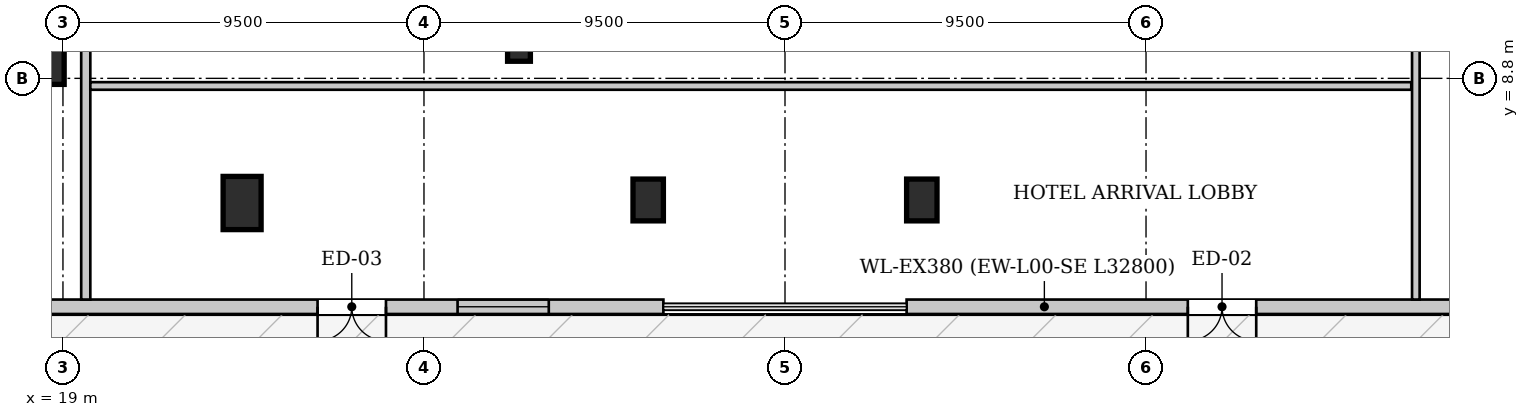
"""IFC4 building model, lengths in metres.
Left out: names, types, materials, properties, quantities, classifications, styles, units other than length and angle.
Written with IfcOpenShell. Run it as: python <this file> out.ifc"""

import sys

from ifc_helpers import new_model, si_unit, direction, frame, frame_2d, origin, origin_2d, place, context, subcontext, project, spatial, rectangle, hollow_rectangle, extrude, source, transform, mapped, element, fill, save


model = new_model("IFC4")
c1 = context("Model", 3, precision=1e-05, world=origin(), true_north=direction((0.0, 1.0)))
c2 = subcontext(c1, "Body", "Model", "MODEL_VIEW")
j1 = project(units=[si_unit("LENGTHUNIT", "METRE"), si_unit("PLANEANGLEUNIT", "RADIAN")], contexts=[c1])
p1 = place(None, origin())
s1 = spatial("IfcSite", under=j1, at=p1, CompositionType="ELEMENT")
p2 = place(p1, origin())
s2 = spatial("IfcBuilding", under=s1, at=p2, CompositionType="ELEMENT")
p3 = place(p2, origin())
s3 = spatial("IfcBuildingStorey", under=s2, at=p3, CompositionType="ELEMENT", Elevation=0.0)
m1 = source(origin(), c2, "Body", "SweptSolid", [
    extrude(rectangle(XDim=1.0, YDim=1.4, at=origin_2d()), origin(), (0.0, 0.0, 1.0), 5.235),
])
for number, where, z_axis, x_axis in (
    (1, (18.532, 9.341, 0.0), (0.0, 0.0, 1.0), (1.0, 0.0, 0.0)),
    (2, (23.714, 5.52, 0.0), (0.0, 0.0, 1.0), (1.0, 0.0, 0.0)),
):
    element("IfcColumn", number, at=place(p3, frame(where, z_axis=z_axis, x_axis=x_axis)), inside=s3, PredefinedType="COLUMN", context=c2, shape_type="MappedRepresentation", body=[
        mapped(m1, transform((0.0, 0.0, 0.0), x_axis=(1.0, 0.0, 0.0), y_axis=(0.0, 1.0, 0.0), z_axis=(0.0, 0.0, 1.0), scale=1.0)),
    ])
m2 = source(origin(), c2, "Body", "SweptSolid", [
    extrude(rectangle(XDim=0.8, YDim=1.1, at=origin_2d()), origin(), (0.0, 0.0, 1.0), 5.235),
])
for number, where, z_axis, x_axis in (
    (3, (34.4, 5.6, 0.0), (0.0, 0.0, 1.0), (1.0, 0.0, 0.0)),
    (4, (41.6, 5.6, 0.0), (0.0, 0.0, 1.0), (1.0, 0.0, 0.0)),
):
    element("IfcColumn", number, at=place(p3, frame(where, z_axis=z_axis, x_axis=x_axis)), inside=s3, PredefinedType="COLUMN", context=c2, shape_type="MappedRepresentation", body=[
        mapped(m2, transform((0.0, 0.0, 0.0), x_axis=(1.0, 0.0, 0.0), y_axis=(0.0, 1.0, 0.0), z_axis=(0.0, 0.0, 1.0), scale=1.0)),
    ])
m3 = source(origin(), c2, "Body", "SweptSolid", [
    extrude(hollow_rectangle(XDim=0.6, YDim=0.6, WallThickness=0.035, at=origin_2d()), origin(), (0.0, 0.0, 1.0), 5.235),
])
p4 = place(p3, frame((31.0, 9.55, 0.0), z_axis=(0.0, 0.0, 1.0), x_axis=(1.0, 0.0, 0.0)))
e5 = element("IfcColumn", 5, at=p4, inside=s3, PredefinedType="COLUMN", context=c2, shape_type="MappedRepresentation", body=[
    mapped(m3, transform((0.0, 0.0, 0.0), x_axis=(1.0, 0.0, 0.0), y_axis=(0.0, 1.0, 0.0), z_axis=(0.0, 0.0, 1.0), scale=1.0)),
])
p5 = place(p3, frame((74.0, 2.79, 0.0), z_axis=(0.0, 0.0, 1.0), x_axis=(-1.0, 0.0, 0.0)))
e6 = element("IfcWall", 6, at=p5, inside=s3, PredefinedType="SOLIDWALL", context=c2, shape_type="SweptSolid", body=[
    extrude(rectangle(XDim=32.8, YDim=0.38, at=frame_2d((16.4, 0.0))), origin(), (0.0, 0.0, 1.0), 4.522),
])
p6 = place(p5, frame((14.6, 0.0, 0.0)))
e7 = element("IfcOpeningElement", 7, at=p6, cuts=e6, PredefinedType="OPENING", context=c2, shape_type="SweptSolid", body=[
    extrude(rectangle(XDim=1.8, YDim=2.4, at=frame_2d((0.9, 1.2))), frame((0.0, 0.2, 0.0), z_axis=(0.0, -1.0, 0.0), x_axis=(1.0, 0.0, 0.0)), (0.0, 0.0, 1.0), 0.4),
])
p7 = place(p5, frame((23.6, 0.0, 0.0)))
e8 = element("IfcOpeningElement", 8, at=p7, cuts=e6, PredefinedType="OPENING", context=c2, shape_type="SweptSolid", body=[
    extrude(rectangle(XDim=1.8, YDim=2.4, at=frame_2d((0.9, 1.2))), frame((0.0, 0.2, 0.0), z_axis=(0.0, -1.0, 0.0), x_axis=(1.0, 0.0, 0.0)), (0.0, 0.0, 1.0), 0.4),
])
p8 = place(p5, frame((6.016, 0.0, 0.85)))
e9 = element("IfcOpeningElement", 9, at=p8, cuts=e6, PredefinedType="OPENING", context=c2, shape_type="SweptSolid", body=[
    extrude(rectangle(XDim=2.4, YDim=3.0, at=frame_2d((1.2, 1.5))), frame((0.0, 0.2, 0.0), z_axis=(0.0, -1.0, 0.0), x_axis=(1.0, 0.0, 0.0)), (0.0, 0.0, 1.0), 0.4),
])
p9 = place(p3, frame((34.8, 2.79, 0.0), z_axis=(0.0, 0.0, 1.0), x_axis=(-1.0, 0.0, 0.0)))
e10 = element("IfcWall", 10, at=p9, inside=s3, PredefinedType="SOLIDWALL", context=c2, shape_type="SweptSolid", body=[
    extrude(rectangle(XDim=32.8, YDim=0.38, at=frame_2d((16.4, 0.0))), origin(), (0.0, 0.0, 1.0), 4.522),
])
p10 = place(p9, frame((7.3, 0.0, 0.0)))
e11 = element("IfcOpeningElement", 11, at=p10, cuts=e10, PredefinedType="OPENING", context=c2, shape_type="SweptSolid", body=[
    extrude(rectangle(XDim=1.8, YDim=2.4, at=frame_2d((0.9, 1.2))), frame((0.0, 0.2, 0.0), z_axis=(0.0, -1.0, 0.0), x_axis=(1.0, 0.0, 0.0)), (0.0, 0.0, 1.0), 0.4),
])
p11 = place(p9, frame((16.46, 0.0, 0.0)))
e12 = element("IfcOpeningElement", 12, at=p11, cuts=e10, PredefinedType="OPENING", context=c2, shape_type="SweptSolid", body=[
    extrude(rectangle(XDim=1.8, YDim=2.4, at=frame_2d((0.9, 1.2))), frame((0.0, 0.2, 0.0), z_axis=(0.0, -1.0, 0.0), x_axis=(1.0, 0.0, 0.0)), (0.0, 0.0, 1.0), 0.4),
])
p12 = place(p9, frame((3.016, 0.0, 0.85)))
e13 = element("IfcOpeningElement", 13, at=p12, cuts=e10, PredefinedType="OPENING", context=c2, shape_type="SweptSolid", body=[
    extrude(rectangle(XDim=2.4, YDim=3.0, at=frame_2d((1.2, 1.5))), frame((0.0, 0.2, 0.0), z_axis=(0.0, -1.0, 0.0), x_axis=(1.0, 0.0, 0.0)), (0.0, 0.0, 1.0), 0.4),
])
p13 = place(p3, frame((19.6, 2.98, 0.0), z_axis=(0.0, 0.0, 1.0), x_axis=(0.0, 1.0, 0.0)))
e14 = element("IfcWall", 14, at=p13, inside=s3, PredefinedType="PARTITIONING", context=c2, shape_type="SweptSolid", body=[
    extrude(rectangle(XDim=16.4, YDim=0.24, at=frame_2d((8.2, 0.0))), origin(), (0.0, 0.0, 1.0), 4.43),
])
p14 = place(p3, frame((19.72, 8.6, 0.0), z_axis=(0.0, 0.0, 1.0), x_axis=(1.0, 0.0, 0.0)))
e15 = element("IfcWall", 15, at=p14, inside=s3, PredefinedType="PARTITIONING", context=c2, shape_type="SweptSolid", body=[
    extrude(rectangle(XDim=34.76, YDim=0.2, at=frame_2d((17.38, 0.0))), origin(), (0.0, 0.0, 1.0), 4.43),
])
p15 = place(p3, frame((54.6, 2.98, 0.0), z_axis=(0.0, 0.0, 1.0), x_axis=(0.0, 1.0, 0.0)))
e16 = element("IfcWall", 16, at=p15, inside=s3, PredefinedType="PARTITIONING", context=c2, shape_type="SweptSolid", body=[
    extrude(rectangle(XDim=39.82, YDim=0.2, at=frame_2d((19.91, 0.0))), origin(), (0.0, 0.0, 1.0), 4.43),
])
p16 = place(p15, frame((13.8, 0.0, 0.0)))
e17 = element("IfcOpeningElement", 17, at=p16, cuts=e16, PredefinedType="OPENING", context=c2, shape_type="SweptSolid", body=[
    extrude(rectangle(XDim=1.6, YDim=2.2, at=frame_2d((0.8, 1.1))), frame((0.0, 0.11, 0.0), z_axis=(0.0, -1.0, 0.0), x_axis=(1.0, 0.0, 0.0)), (0.0, 0.0, 1.0), 0.22),
])
p17 = place(p15, frame((24.0, 0.0, 0.0)))
e18 = element("IfcOpeningElement", 18, at=p17, cuts=e16, PredefinedType="OPENING", context=c2, shape_type="SweptSolid", body=[
    extrude(rectangle(XDim=1.6, YDim=2.2, at=frame_2d((0.8, 1.1))), frame((0.0, 0.11, 0.0), z_axis=(0.0, -1.0, 0.0), x_axis=(1.0, 0.0, 0.0)), (0.0, 0.0, 1.0), 0.22),
])
m4 = source(origin(), c2, "Body", "SweptSolid", [
    extrude(rectangle(XDim=1.8, YDim=2.4, at=frame_2d((0.9, 1.2))), frame((0.0, 0.025, 0.0), z_axis=(0.0, -1.0, 0.0), x_axis=(1.0, 0.0, 0.0)), (0.0, 0.0, 1.0), 0.05),
])
p18 = place(p7, origin())
e19 = element("IfcDoor", 19, at=p18, inside=s3, OperationType="DOUBLE_DOOR_SINGLE_SWING", PredefinedType="DOOR", context=c2, shape_type="MappedRepresentation", body=[
    mapped(m4, transform((0.0, 0.0, 0.0), x_axis=(1.0, 0.0, 0.0), y_axis=(0.0, 1.0, 0.0), z_axis=(0.0, 0.0, 1.0), scale=1.0)),
])
fill(e8, e19)
p19 = place(p10, origin())
e20 = element("IfcDoor", 20, at=p19, inside=s3, OperationType="DOUBLE_DOOR_SINGLE_SWING", PredefinedType="DOOR", context=c2, shape_type="MappedRepresentation", body=[
    mapped(m4, transform((0.0, 0.0, 0.0), x_axis=(1.0, 0.0, 0.0), y_axis=(0.0, 1.0, 0.0), z_axis=(0.0, 0.0, 1.0), scale=1.0)),
])
fill(e11, e20)
m5 = source(origin(), c2, "Body", "SweptSolid", [
    extrude(rectangle(XDim=2.4, YDim=3.0, at=frame_2d((1.2, 1.5))), frame((0.0, 0.03, 0.0), z_axis=(0.0, -1.0, 0.0), x_axis=(1.0, 0.0, 0.0)), (0.0, 0.0, 1.0), 0.06),
])
p20 = place(p12, origin())
e21 = element("IfcWindow", 21, at=p20, inside=s3, PartitioningType="SINGLE_PANEL", PredefinedType="WINDOW", context=c2, shape_type="MappedRepresentation", body=[
    mapped(m5, transform((0.0, 0.0, 0.0), x_axis=(1.0, 0.0, 0.0), y_axis=(0.0, 1.0, 0.0), z_axis=(0.0, 0.0, 1.0), scale=1.0)),
])
fill(e13, e21)
save(model, sys.argv[1])
